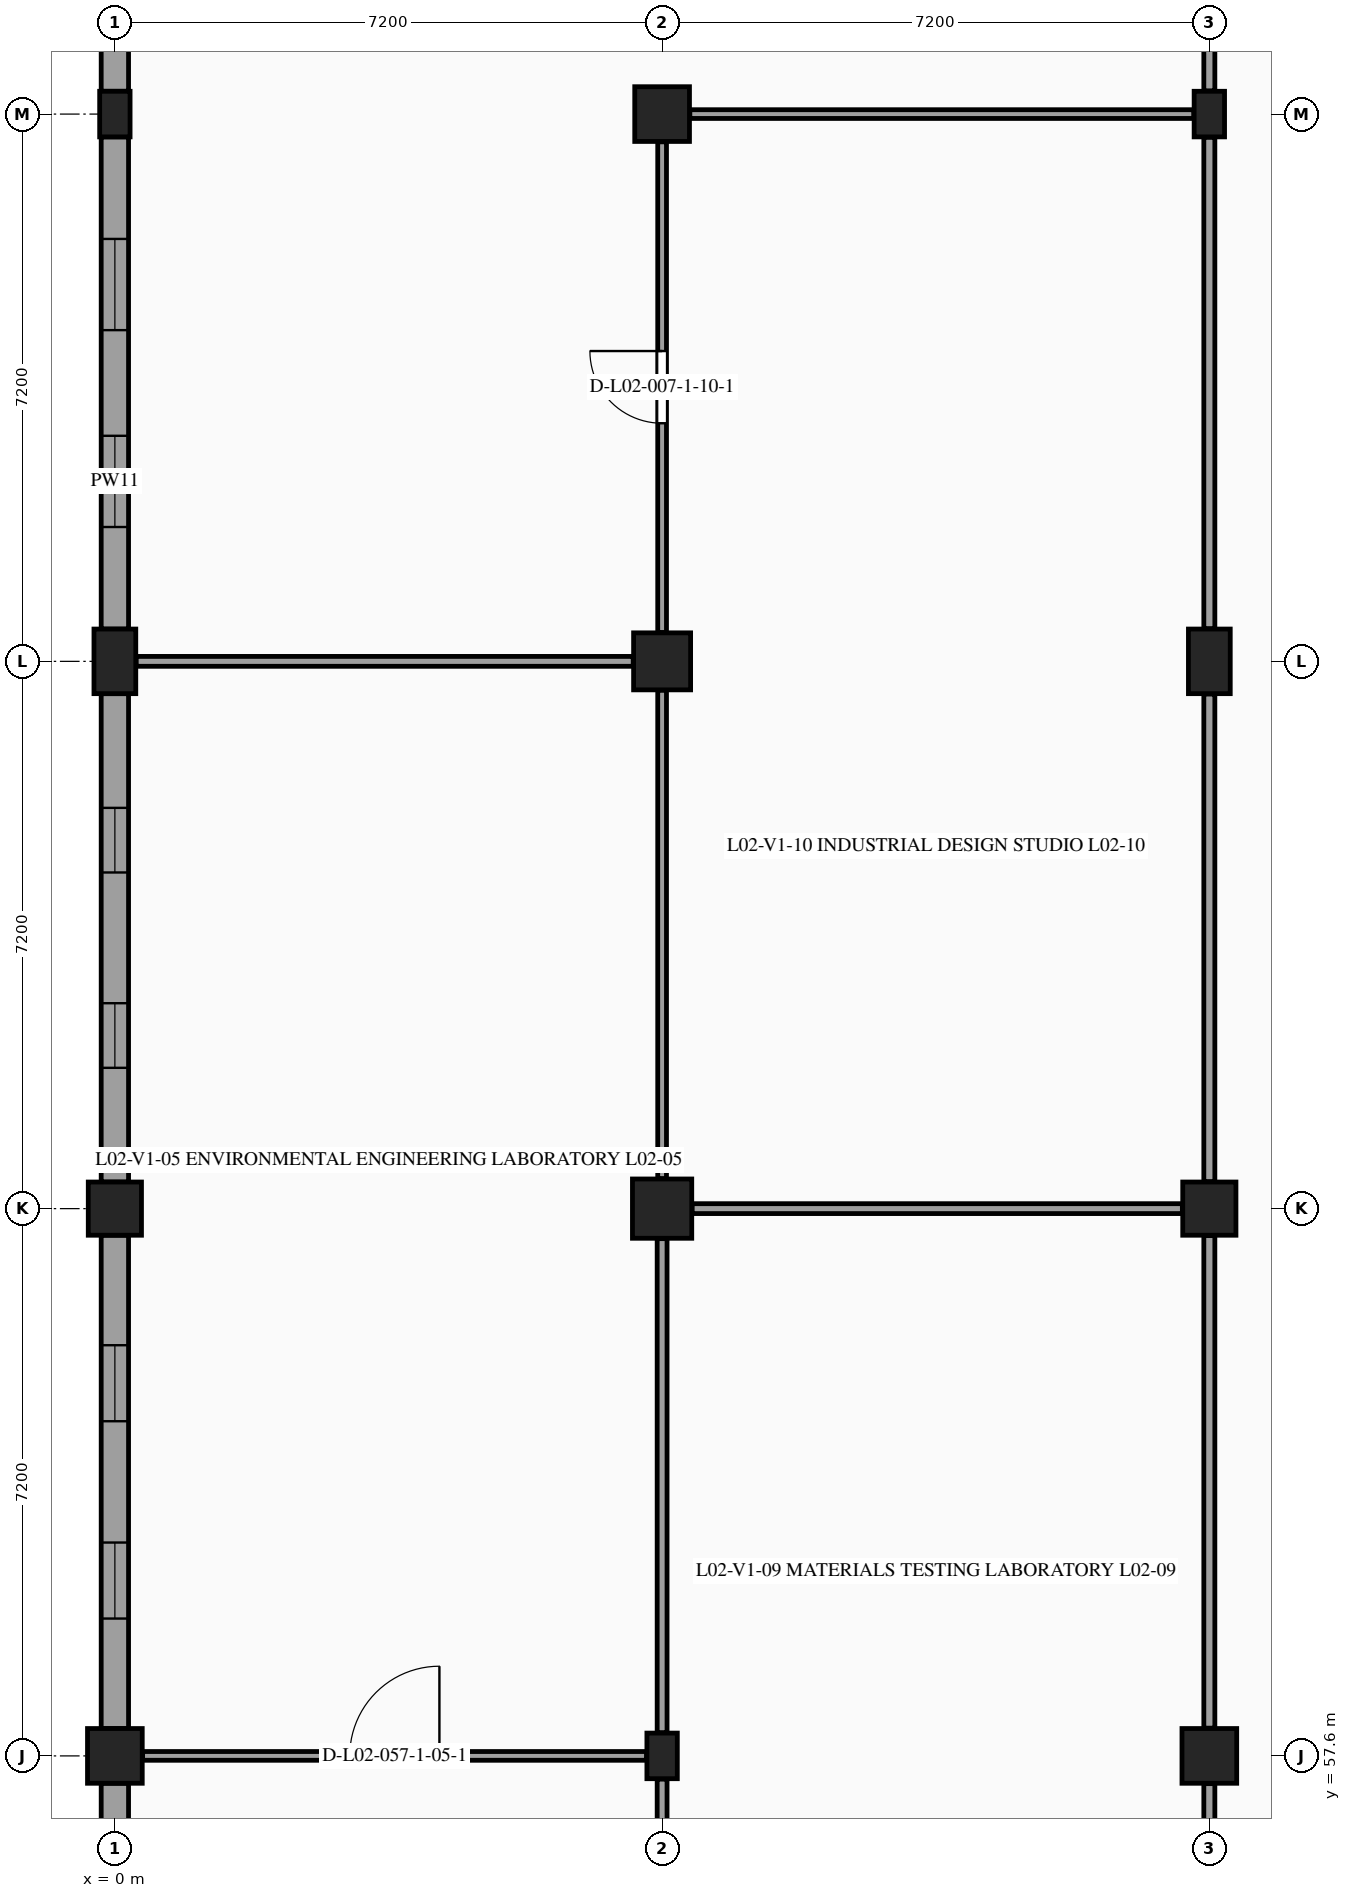
"""IFC4 building model, lengths in metres.
Left out: names, types, materials, properties, quantities, classifications, styles, units other than length and angle.
Written with IfcOpenShell. Run it as: python <this file> out.ifc"""

import sys

from ifc_helpers import new_model, si_unit, direction, frame, frame_2d, origin, origin_2d, place, context, subcontext, project, spatial, rectangle, extrude, element, fill, save


model = new_model("IFC4")
c1 = context("Model", 3, precision=1e-05, world=origin(), true_north=direction((0.0, 1.0)))
c2 = subcontext(c1, "Body", "Model", "MODEL_VIEW")
j1 = project(units=[si_unit("LENGTHUNIT", "METRE"), si_unit("PLANEANGLEUNIT", "RADIAN")], contexts=[c1])
p1 = place(None, origin())
s1 = spatial("IfcSite", under=j1, at=p1, CompositionType="ELEMENT")
p2 = place(p1, origin())
s2 = spatial("IfcBuilding", under=s1, at=p2, CompositionType="ELEMENT")
p3 = place(p2, frame((0.0, 0.0, 9.9)))
s3 = spatial("IfcBuildingStorey", under=s2, at=p3, CompositionType="ELEMENT", Elevation=9.9)
p4 = place(p3, frame((0.0, 57.6, 0.0), z_axis=(0.0, 0.0, 1.0), x_axis=(1.0, 0.0, 0.0)))
e1 = element("IfcColumn", 1, at=p4, inside=s3, PredefinedType="COLUMN", context=c2, shape_type="SweptSolid", body=[
    extrude(rectangle(XDim=0.72, YDim=0.72, at=origin_2d()), origin(), (0.0, 0.0, 1.0), 4.5),
])
p5 = place(p3, frame((0.0, 64.8, 0.0), z_axis=(0.0, 0.0, 1.0), x_axis=(1.0, 0.0, 0.0)))
e2 = element("IfcColumn", 2, at=p5, inside=s3, PredefinedType="COLUMN", context=c2, shape_type="SweptSolid", body=[
    extrude(rectangle(XDim=0.7, YDim=0.7, at=origin_2d()), origin(), (0.0, 0.0, 1.0), 4.5),
])
p6 = place(p3, frame((0.0, 72.0, 0.0), z_axis=(0.0, 0.0, 1.0), x_axis=(1.0, 0.0, 0.0)))
e3 = element("IfcColumn", 3, at=p6, inside=s3, PredefinedType="COLUMN", context=c2, shape_type="SweptSolid", body=[
    extrude(rectangle(XDim=0.55, YDim=0.85, at=origin_2d()), origin(), (0.0, 0.0, 1.0), 4.5),
])
for number, where, z_axis, x_axis in (
    (4, (0.0, 79.2, 0.0), (0.0, 0.0, 1.0), (1.0, 0.0, 0.0)),
    (5, (7.2, 57.6, 0.0), (0.0, 0.0, 1.0), (1.0, 0.0, 0.0)),
):
    element("IfcColumn", number, at=place(p3, frame(where, z_axis=z_axis, x_axis=x_axis)), inside=s3, PredefinedType="PILASTER", context=c2, shape_type="SweptSolid", body=[
        extrude(rectangle(XDim=0.4, YDim=0.6, at=origin_2d()), origin(), (0.0, 0.0, 1.0), 4.5),
    ])
p7 = place(p3, frame((7.2, 64.8, 0.0), z_axis=(0.0, 0.0, 1.0), x_axis=(1.0, 0.0, 0.0)))
e6 = element("IfcColumn", 6, at=p7, inside=s3, PredefinedType="COLUMN", context=c2, shape_type="SweptSolid", body=[
    extrude(rectangle(XDim=0.78, YDim=0.78, at=origin_2d()), origin(), (0.0, 0.0, 1.0), 4.5),
])
p8 = place(p3, frame((7.2, 72.0, 0.0), z_axis=(0.0, 0.0, 1.0), x_axis=(1.0, 0.0, 0.0)))
e7 = element("IfcColumn", 7, at=p8, inside=s3, PredefinedType="COLUMN", context=c2, shape_type="SweptSolid", body=[
    extrude(rectangle(XDim=0.75, YDim=0.75, at=origin_2d()), origin(), (0.0, 0.0, 1.0), 4.5),
])
for number, where, z_axis, x_axis in (
    (8, (7.2, 79.2, 0.0), (0.0, 0.0, 1.0), (1.0, 0.0, 0.0)),
    (9, (14.4, 57.6, 0.0), (0.0, 0.0, 1.0), (1.0, 0.0, 0.0)),
):
    element("IfcColumn", number, at=place(p3, frame(where, z_axis=z_axis, x_axis=x_axis)), inside=s3, PredefinedType="COLUMN", context=c2, shape_type="SweptSolid", body=[
        extrude(rectangle(XDim=0.72, YDim=0.72, at=origin_2d()), origin(), (0.0, 0.0, 1.0), 4.5),
    ])
p9 = place(p3, frame((14.4, 64.8, 0.0), z_axis=(0.0, 0.0, 1.0), x_axis=(1.0, 0.0, 0.0)))
e10 = element("IfcColumn", 10, at=p9, inside=s3, PredefinedType="COLUMN", context=c2, shape_type="SweptSolid", body=[
    extrude(rectangle(XDim=0.7, YDim=0.7, at=origin_2d()), origin(), (0.0, 0.0, 1.0), 4.5),
])
p10 = place(p3, frame((14.4, 72.0, 0.0), z_axis=(0.0, 0.0, 1.0), x_axis=(1.0, 0.0, 0.0)))
e11 = element("IfcColumn", 11, at=p10, inside=s3, PredefinedType="COLUMN", context=c2, shape_type="SweptSolid", body=[
    extrude(rectangle(XDim=0.55, YDim=0.85, at=origin_2d()), origin(), (0.0, 0.0, 1.0), 4.5),
])
p11 = place(p3, frame((14.4, 79.2, 0.0), z_axis=(0.0, 0.0, 1.0), x_axis=(1.0, 0.0, 0.0)))
e12 = element("IfcColumn", 12, at=p11, inside=s3, PredefinedType="PILASTER", context=c2, shape_type="SweptSolid", body=[
    extrude(rectangle(XDim=0.4, YDim=0.6, at=origin_2d()), origin(), (0.0, 0.0, 1.0), 4.5),
])
p12 = place(p3, frame((0.0, 50.775, 0.0), z_axis=(0.0, 0.0, 1.0), x_axis=(0.0, 1.0, 0.0)))
e13 = element("IfcWall", 13, at=p12, inside=s3, PredefinedType="STANDARD", context=c2, shape_type="SweptSolid", body=[
    extrude(rectangle(XDim=6.465, YDim=0.36, at=frame_2d((3.232, 0.0))), origin(), (0.0, 0.0, 1.0), 3.47),
])
p13 = place(p12, frame((1.365, 0.0, 1.15)))
e14 = element("IfcOpeningElement", 14, at=p13, cuts=e13, PredefinedType="OPENING", context=c2, shape_type="SweptSolid", body=[
    extrude(rectangle(XDim=1.15, YDim=1.2, at=frame_2d((0.575, 0.6))), frame((0.0, 0.19, 0.0), z_axis=(0.0, -1.0, 0.0), x_axis=(1.0, 0.0, 0.0)), (0.0, 0.0, 1.0), 0.38),
])
p14 = place(p12, frame((3.95, 0.0, 1.15)))
e15 = element("IfcOpeningElement", 15, at=p14, cuts=e13, PredefinedType="OPENING", context=c2, shape_type="SweptSolid", body=[
    extrude(rectangle(XDim=1.15, YDim=1.2, at=frame_2d((0.575, 0.6))), frame((0.0, 0.19, 0.0), z_axis=(0.0, -1.0, 0.0), x_axis=(1.0, 0.0, 0.0)), (0.0, 0.0, 1.0), 0.38),
])
p15 = place(p3, frame((0.0, 57.96, 0.0), z_axis=(0.0, 0.0, 1.0), x_axis=(0.0, 1.0, 0.0)))
e16 = element("IfcWall", 16, at=p15, inside=s3, PredefinedType="STANDARD", context=c2, shape_type="SweptSolid", body=[
    extrude(rectangle(XDim=6.49, YDim=0.36, at=frame_2d((3.245, 0.0))), origin(), (0.0, 0.0, 1.0), 3.47),
])
p16 = place(p15, frame((1.447, 0.0, 1.15)))
e17 = element("IfcOpeningElement", 17, at=p16, cuts=e16, PredefinedType="OPENING", context=c2, shape_type="SweptSolid", body=[
    extrude(rectangle(XDim=1.0, YDim=1.2, at=frame_2d((0.5, 0.6))), frame((0.0, 0.19, 0.0), z_axis=(0.0, -1.0, 0.0), x_axis=(1.0, 0.0, 0.0)), (0.0, 0.0, 1.0), 0.38),
])
p17 = place(p15, frame((4.043, 0.0, 1.15)))
e18 = element("IfcOpeningElement", 18, at=p17, cuts=e16, PredefinedType="OPENING", context=c2, shape_type="SweptSolid", body=[
    extrude(rectangle(XDim=1.0, YDim=1.2, at=frame_2d((0.5, 0.6))), frame((0.0, 0.19, 0.0), z_axis=(0.0, -1.0, 0.0), x_axis=(1.0, 0.0, 0.0)), (0.0, 0.0, 1.0), 0.38),
])
p18 = place(p3, frame((0.0, 65.15, 0.0), z_axis=(0.0, 0.0, 1.0), x_axis=(0.0, 1.0, 0.0)))
e19 = element("IfcWall", 19, at=p18, inside=s3, PredefinedType="STANDARD", context=c2, shape_type="SweptSolid", body=[
    extrude(rectangle(XDim=6.425, YDim=0.36, at=frame_2d((3.212, 0.0))), origin(), (0.0, 0.0, 1.0), 3.47),
])
p19 = place(p18, frame((1.502, 0.0, 1.15)))
e20 = element("IfcOpeningElement", 20, at=p19, cuts=e19, PredefinedType="OPENING", context=c2, shape_type="SweptSolid", body=[
    extrude(rectangle(XDim=0.85, YDim=1.25, at=frame_2d((0.425, 0.625))), frame((0.0, 0.19, 0.0), z_axis=(0.0, -1.0, 0.0), x_axis=(1.0, 0.0, 0.0)), (0.0, 0.0, 1.0), 0.38),
])
p20 = place(p18, frame((4.073, 0.0, 1.15)))
e21 = element("IfcOpeningElement", 21, at=p20, cuts=e19, PredefinedType="OPENING", context=c2, shape_type="SweptSolid", body=[
    extrude(rectangle(XDim=0.85, YDim=1.25, at=frame_2d((0.425, 0.625))), frame((0.0, 0.19, 0.0), z_axis=(0.0, -1.0, 0.0), x_axis=(1.0, 0.0, 0.0)), (0.0, 0.0, 1.0), 0.38),
])
p21 = place(p3, frame((0.0, 72.425, 0.0), z_axis=(0.0, 0.0, 1.0), x_axis=(0.0, 1.0, 0.0)))
e22 = element("IfcWall", 22, at=p21, inside=s3, PredefinedType="STANDARD", context=c2, shape_type="SweptSolid", body=[
    extrude(rectangle(XDim=6.475, YDim=0.36, at=frame_2d((3.237, 0.0))), origin(), (0.0, 0.0, 1.0), 3.47),
])
p22 = place(p21, frame((1.343, 0.0, 1.15)))
e23 = element("IfcOpeningElement", 23, at=p22, cuts=e22, PredefinedType="OPENING", context=c2, shape_type="SweptSolid", body=[
    extrude(rectangle(XDim=1.2, YDim=1.35, at=frame_2d((0.6, 0.675))), frame((0.0, 0.19, 0.0), z_axis=(0.0, -1.0, 0.0), x_axis=(1.0, 0.0, 0.0)), (0.0, 0.0, 1.0), 0.38),
])
p23 = place(p21, frame((3.933, 0.0, 1.15)))
e24 = element("IfcOpeningElement", 24, at=p23, cuts=e22, PredefinedType="OPENING", context=c2, shape_type="SweptSolid", body=[
    extrude(rectangle(XDim=1.2, YDim=1.35, at=frame_2d((0.6, 0.675))), frame((0.0, 0.19, 0.0), z_axis=(0.0, -1.0, 0.0), x_axis=(1.0, 0.0, 0.0)), (0.0, 0.0, 1.0), 0.38),
])
p24 = place(p3, frame((0.0, 79.5, 0.0), z_axis=(0.0, 0.0, 1.0), x_axis=(0.0, 1.0, 0.0)))
e25 = element("IfcWall", 25, at=p24, inside=s3, PredefinedType="STANDARD", context=c2, shape_type="SweptSolid", body=[
    extrude(rectangle(XDim=6.51, YDim=0.36, at=frame_2d((3.255, 0.0))), origin(), (0.0, 0.0, 1.0), 3.47),
])
p25 = place(p24, frame((1.428, 0.0, 1.15)))
e26 = element("IfcOpeningElement", 26, at=p25, cuts=e25, PredefinedType="OPENING", context=c2, shape_type="SweptSolid", body=[
    extrude(rectangle(XDim=1.05, YDim=1.35, at=frame_2d((0.525, 0.675))), frame((0.0, 0.19, 0.0), z_axis=(0.0, -1.0, 0.0), x_axis=(1.0, 0.0, 0.0)), (0.0, 0.0, 1.0), 0.38),
])
p26 = place(p24, frame((4.032, 0.0, 1.15)))
e27 = element("IfcOpeningElement", 27, at=p26, cuts=e25, PredefinedType="OPENING", context=c2, shape_type="SweptSolid", body=[
    extrude(rectangle(XDim=1.05, YDim=1.35, at=frame_2d((0.525, 0.675))), frame((0.0, 0.19, 0.0), z_axis=(0.0, -1.0, 0.0), x_axis=(1.0, 0.0, 0.0)), (0.0, 0.0, 1.0), 0.38),
])
p27 = place(p3, frame((7.2, 50.83, 0.0), z_axis=(0.0, 0.0, 1.0), x_axis=(0.0, 1.0, 0.0)))
e28 = element("IfcWall", 28, at=p27, inside=s3, PredefinedType="PARTITIONING", context=c2, shape_type="SweptSolid", body=[
    extrude(rectangle(XDim=6.465, YDim=0.13, at=frame_2d((3.232, 0.0))), origin(), (0.0, 0.0, 1.0), 3.54),
])
p28 = place(p3, frame((0.365, 57.6, 0.0), z_axis=(0.0, 0.0, 1.0), x_axis=(1.0, 0.0, 0.0)))
e29 = element("IfcWall", 29, at=p28, inside=s3, PredefinedType="PARTITIONING", context=c2, shape_type="SweptSolid", body=[
    extrude(rectangle(XDim=6.63, YDim=0.115, at=frame_2d((3.315, 0.0))), origin(), (0.0, 0.0, 1.0), 3.485),
])
p29 = place(p28, frame((2.725, 0.0, 0.0)))
e30 = element("IfcOpeningElement", 30, at=p29, cuts=e29, PredefinedType="OPENING", context=c2, shape_type="SweptSolid", body=[
    extrude(rectangle(XDim=1.18, YDim=2.18, at=frame_2d((0.59, 1.09))), frame((0.0, 0.067, 0.0), z_axis=(0.0, -1.0, 0.0), x_axis=(1.0, 0.0, 0.0)), (0.0, 0.0, 1.0), 0.135),
])
p30 = place(p3, frame((7.2, 57.905, 0.0), z_axis=(0.0, 0.0, 1.0), x_axis=(0.0, 1.0, 0.0)))
e31 = element("IfcWall", 31, at=p30, inside=s3, PredefinedType="PARTITIONING", context=c2, shape_type="SweptSolid", body=[
    extrude(rectangle(XDim=6.5, YDim=0.13, at=frame_2d((3.25, 0.0))), origin(), (0.0, 0.0, 1.0), 3.535),
])
p31 = place(p3, frame((7.2, 65.195, 0.0), z_axis=(0.0, 0.0, 1.0), x_axis=(0.0, 1.0, 0.0)))
e32 = element("IfcWall", 32, at=p31, inside=s3, PredefinedType="PARTITIONING", context=c2, shape_type="SweptSolid", body=[
    extrude(rectangle(XDim=6.425, YDim=0.115, at=frame_2d((3.212, 0.0))), origin(), (0.0, 0.0, 1.0), 3.53),
])
p32 = place(p3, frame((0.28, 72.0, 0.0), z_axis=(0.0, 0.0, 1.0), x_axis=(1.0, 0.0, 0.0)))
e33 = element("IfcWall", 33, at=p32, inside=s3, PredefinedType="PARTITIONING", context=c2, shape_type="SweptSolid", body=[
    extrude(rectangle(XDim=6.54, YDim=0.13, at=frame_2d((3.27, 0.0))), origin(), (0.0, 0.0, 1.0), 3.485),
])
p33 = place(p3, frame((7.2, 72.38, 0.0), z_axis=(0.0, 0.0, 1.0), x_axis=(0.0, 1.0, 0.0)))
e34 = element("IfcWall", 34, at=p33, inside=s3, PredefinedType="PARTITIONING", context=c2, shape_type="SweptSolid", body=[
    extrude(rectangle(XDim=6.455, YDim=0.115, at=frame_2d((3.228, 0.0))), origin(), (0.0, 0.0, 1.0), 3.53),
])
p34 = place(p33, frame((2.752, 0.0, 0.0)))
e35 = element("IfcOpeningElement", 35, at=p34, cuts=e34, PredefinedType="OPENING", context=c2, shape_type="SweptSolid", body=[
    extrude(rectangle(XDim=0.95, YDim=2.15, at=frame_2d((0.475, 1.075))), frame((0.0, 0.067, 0.0), z_axis=(0.0, -1.0, 0.0), x_axis=(1.0, 0.0, 0.0)), (0.0, 0.0, 1.0), 0.135),
])
p35 = place(p3, frame((14.4, 50.78, 0.0), z_axis=(0.0, 0.0, 1.0), x_axis=(0.0, 1.0, 0.0)))
e36 = element("IfcWall", 36, at=p35, inside=s3, PredefinedType="PARTITIONING", context=c2, shape_type="SweptSolid", body=[
    extrude(rectangle(XDim=6.455, YDim=0.145, at=frame_2d((3.228, 0.0))), origin(), (0.0, 0.0, 1.0), 3.54),
])
p36 = place(p35, frame((2.677, 0.0, 0.0)))
e37 = element("IfcOpeningElement", 37, at=p36, cuts=e36, PredefinedType="OPENING", context=c2, shape_type="SweptSolid", body=[
    extrude(rectangle(XDim=1.1, YDim=2.15, at=frame_2d((0.55, 1.075))), frame((0.0, 0.083, 0.0), z_axis=(0.0, -1.0, 0.0), x_axis=(1.0, 0.0, 0.0)), (0.0, 0.0, 1.0), 0.165),
])
p37 = place(p3, frame((14.4, 57.965, 0.0), z_axis=(0.0, 0.0, 1.0), x_axis=(0.0, 1.0, 0.0)))
e38 = element("IfcWall", 38, at=p37, inside=s3, PredefinedType="PARTITIONING", context=c2, shape_type="SweptSolid", body=[
    extrude(rectangle(XDim=6.48, YDim=0.145, at=frame_2d((3.24, 0.0))), origin(), (0.0, 0.0, 1.0), 3.535),
])
p38 = place(p3, frame((7.595, 64.8, 0.0), z_axis=(0.0, 0.0, 1.0), x_axis=(1.0, 0.0, 0.0)))
e39 = element("IfcWall", 39, at=p38, inside=s3, PredefinedType="PARTITIONING", context=c2, shape_type="SweptSolid", body=[
    extrude(rectangle(XDim=6.45, YDim=0.13, at=frame_2d((3.225, 0.0))), origin(), (0.0, 0.0, 1.0), 3.5),
])
p39 = place(p3, frame((14.4, 65.155, 0.0), z_axis=(0.0, 0.0, 1.0), x_axis=(0.0, 1.0, 0.0)))
e40 = element("IfcWall", 40, at=p39, inside=s3, PredefinedType="PARTITIONING", context=c2, shape_type="SweptSolid", body=[
    extrude(rectangle(XDim=6.415, YDim=0.145, at=frame_2d((3.208, 0.0))), origin(), (0.0, 0.0, 1.0), 3.53),
])
p40 = place(p3, frame((14.4, 72.43, 0.0), z_axis=(0.0, 0.0, 1.0), x_axis=(0.0, 1.0, 0.0)))
e41 = element("IfcWall", 41, at=p40, inside=s3, PredefinedType="PARTITIONING", context=c2, shape_type="SweptSolid", body=[
    extrude(rectangle(XDim=6.465, YDim=0.145, at=frame_2d((3.232, 0.0))), origin(), (0.0, 0.0, 1.0), 3.53),
])
p41 = place(p3, frame((7.565, 79.2, 0.0), z_axis=(0.0, 0.0, 1.0), x_axis=(1.0, 0.0, 0.0)))
e42 = element("IfcWall", 42, at=p41, inside=s3, PredefinedType="PARTITIONING", context=c2, shape_type="SweptSolid", body=[
    extrude(rectangle(XDim=6.63, YDim=0.115, at=frame_2d((3.315, 0.0))), origin(), (0.0, 0.0, 1.0), 3.5),
])
p42 = place(p3, frame((14.4, 79.505, 0.0), z_axis=(0.0, 0.0, 1.0), x_axis=(0.0, 1.0, 0.0)))
e43 = element("IfcWall", 43, at=p42, inside=s3, PredefinedType="PARTITIONING", context=c2, shape_type="SweptSolid", body=[
    extrude(rectangle(XDim=6.5, YDim=0.145, at=frame_2d((3.25, 0.0))), origin(), (0.0, 0.0, 1.0), 3.595),
])
p43 = place(p42, frame((2.66, 0.0, 0.0)))
e44 = element("IfcOpeningElement", 44, at=p43, cuts=e43, PredefinedType="OPENING", context=c2, shape_type="SweptSolid", body=[
    extrude(rectangle(XDim=1.18, YDim=2.18, at=frame_2d((0.59, 1.09))), frame((0.0, 0.083, 0.0), z_axis=(0.0, -1.0, 0.0), x_axis=(1.0, 0.0, 0.0)), (0.0, 0.0, 1.0), 0.165),
])
p44 = place(p16, origin())
e45 = element("IfcWindow", 45, at=p44, inside=s3, PartitioningType="SINGLE_PANEL", PredefinedType="WINDOW", context=c2, shape_type="SweptSolid", body=[
    extrude(rectangle(XDim=1.0, YDim=1.2, at=frame_2d((0.5, 0.6))), frame((0.0, -0.08, 0.0), z_axis=(0.0, -1.0, 0.0), x_axis=(1.0, 0.0, 0.0)), (0.0, 0.0, 1.0), 0.06),
])
fill(e17, e45)
p45 = place(p17, origin())
e46 = element("IfcWindow", 46, at=p45, inside=s3, PartitioningType="SINGLE_PANEL", PredefinedType="WINDOW", context=c2, shape_type="SweptSolid", body=[
    extrude(rectangle(XDim=1.0, YDim=1.2, at=frame_2d((0.5, 0.6))), frame((0.0, -0.08, 0.0), z_axis=(0.0, -1.0, 0.0), x_axis=(1.0, 0.0, 0.0)), (0.0, 0.0, 1.0), 0.06),
])
fill(e18, e46)
p46 = place(p19, origin())
e47 = element("IfcWindow", 47, at=p46, inside=s3, PartitioningType="SINGLE_PANEL", PredefinedType="WINDOW", context=c2, shape_type="SweptSolid", body=[
    extrude(rectangle(XDim=0.85, YDim=1.25, at=frame_2d((0.425, 0.625))), frame((0.0, -0.08, 0.0), z_axis=(0.0, -1.0, 0.0), x_axis=(1.0, 0.0, 0.0)), (0.0, 0.0, 1.0), 0.06),
])
fill(e20, e47)
p47 = place(p20, origin())
e48 = element("IfcWindow", 48, at=p47, inside=s3, PartitioningType="SINGLE_PANEL", PredefinedType="WINDOW", context=c2, shape_type="SweptSolid", body=[
    extrude(rectangle(XDim=0.85, YDim=1.25, at=frame_2d((0.425, 0.625))), frame((0.0, -0.08, 0.0), z_axis=(0.0, -1.0, 0.0), x_axis=(1.0, 0.0, 0.0)), (0.0, 0.0, 1.0), 0.06),
])
fill(e21, e48)
p48 = place(p22, origin())
e49 = element("IfcWindow", 49, at=p48, inside=s3, PartitioningType="SINGLE_PANEL", PredefinedType="WINDOW", context=c2, shape_type="SweptSolid", body=[
    extrude(rectangle(XDim=1.2, YDim=1.35, at=frame_2d((0.6, 0.675))), frame((0.0, -0.08, 0.0), z_axis=(0.0, -1.0, 0.0), x_axis=(1.0, 0.0, 0.0)), (0.0, 0.0, 1.0), 0.06),
])
fill(e23, e49)
p49 = place(p23, origin())
e50 = element("IfcWindow", 50, at=p49, inside=s3, PartitioningType="SINGLE_PANEL", PredefinedType="WINDOW", context=c2, shape_type="SweptSolid", body=[
    extrude(rectangle(XDim=1.2, YDim=1.35, at=frame_2d((0.6, 0.675))), frame((0.0, -0.08, 0.0), z_axis=(0.0, -1.0, 0.0), x_axis=(1.0, 0.0, 0.0)), (0.0, 0.0, 1.0), 0.06),
])
fill(e24, e50)
p50 = place(p34, origin())
e51 = element("IfcDoor", 51, at=p50, inside=s3, OperationType="SINGLE_SWING_RIGHT", PredefinedType="DOOR", context=c2, shape_type="SweptSolid", body=[
    extrude(rectangle(XDim=0.95, YDim=2.15, at=frame_2d((0.475, 1.075))), frame((0.0, 0.025, 0.0), z_axis=(0.0, -1.0, 0.0), x_axis=(1.0, 0.0, 0.0)), (0.0, 0.0, 1.0), 0.05),
])
fill(e35, e51)
p51 = place(p29, origin())
e52 = element("IfcDoor", 52, at=p51, inside=s3, OperationType="SINGLE_SWING_RIGHT", PredefinedType="DOOR", context=c2, shape_type="SweptSolid", body=[
    extrude(rectangle(XDim=1.18, YDim=2.18, at=frame_2d((0.59, 1.09))), frame((0.0, 0.025, 0.0), z_axis=(0.0, -1.0, 0.0), x_axis=(1.0, 0.0, 0.0)), (0.0, 0.0, 1.0), 0.05),
])
fill(e30, e52)
save(model, sys.argv[1])
